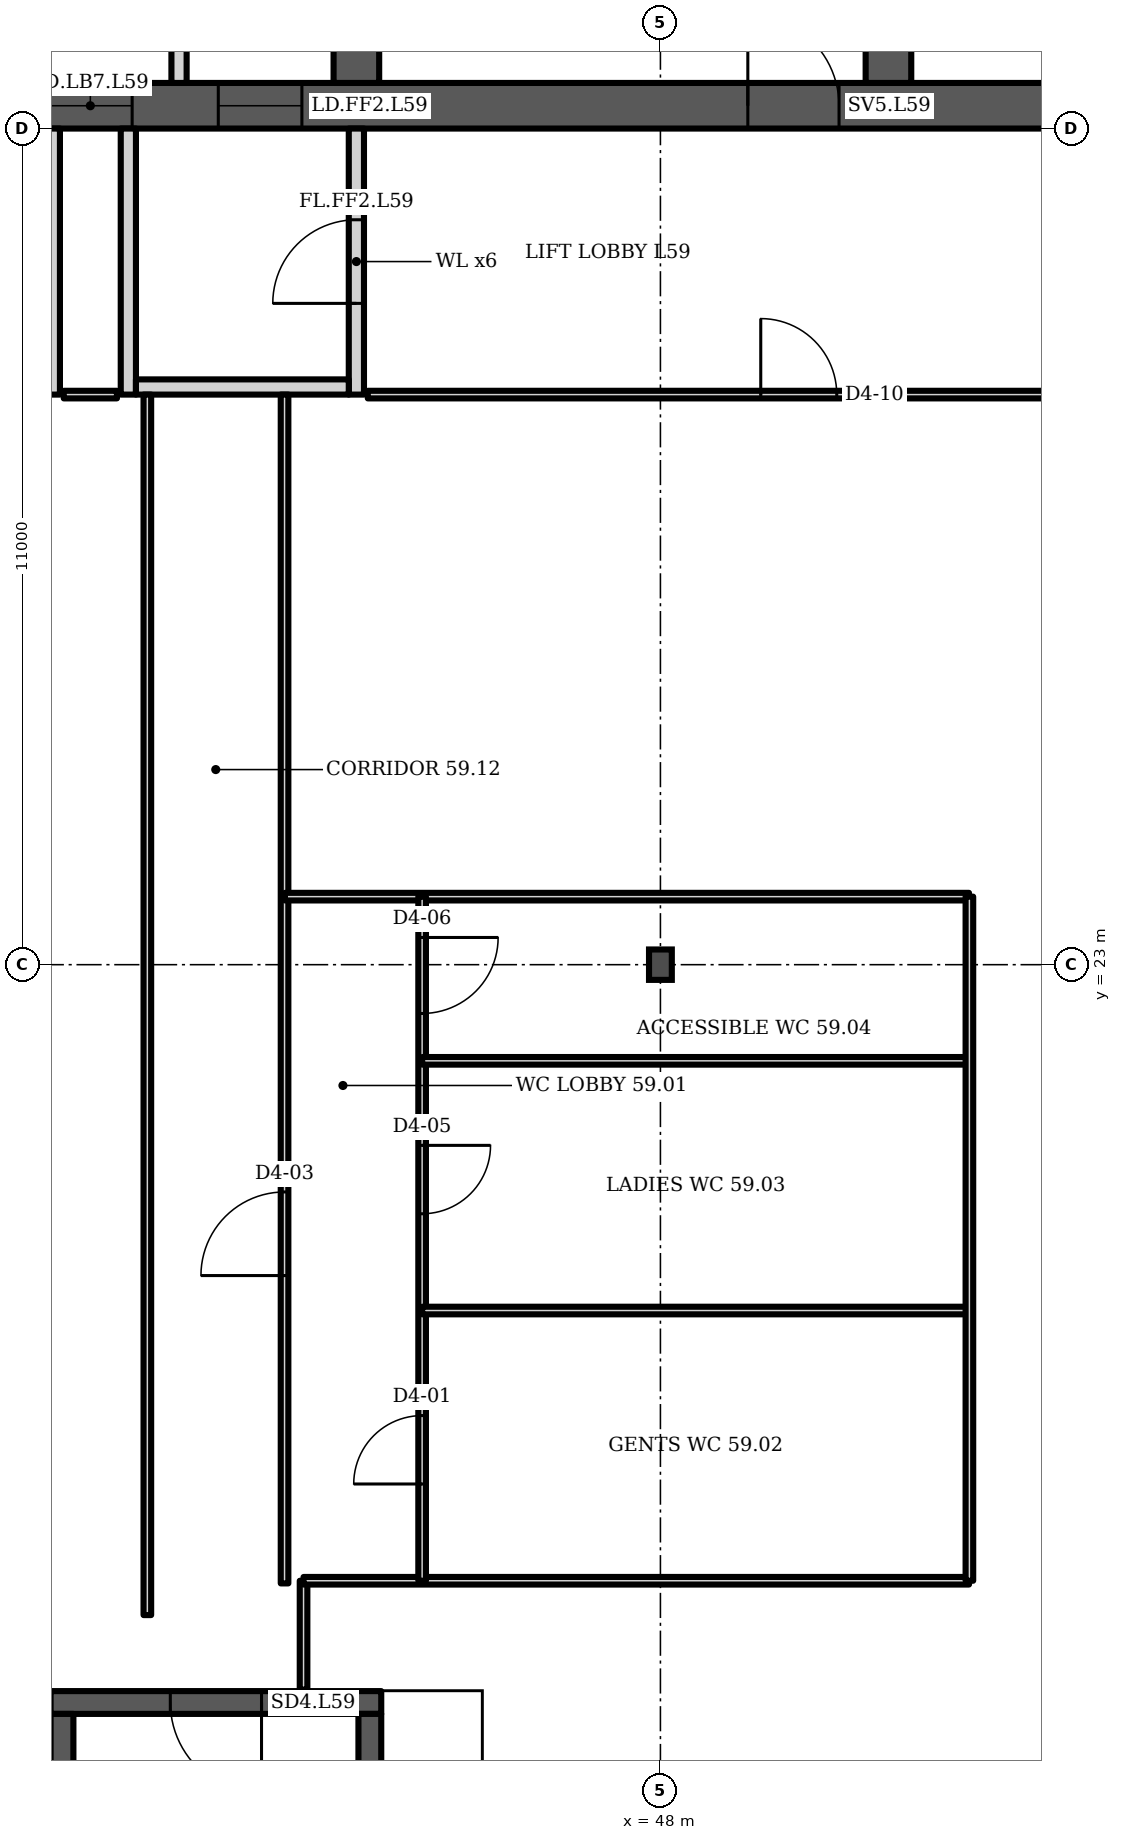
"""IFC4 building model, lengths in metres.
Left out: names, types, materials, properties, quantities, classifications, styles, units other than length and angle.
Written with IfcOpenShell. Run it as: python <this file> out.ifc"""

import sys

from ifc_helpers import new_model, si_unit, direction, frame, frame_2d, origin, origin_2d, place, context, subcontext, project, spatial, polyline, rectangle, i_section, outline, extrude, element, fill, save


model = new_model("IFC4")
c1 = context("Model", 3, precision=1e-05, world=origin(), true_north=direction((0.0, 1.0)))
c2 = subcontext(c1, "Body", "Model", "MODEL_VIEW")
j1 = project(units=[si_unit("LENGTHUNIT", "METRE"), si_unit("PLANEANGLEUNIT", "RADIAN")], contexts=[c1])
p1 = place(None, origin())
s1 = spatial("IfcSite", under=j1, at=p1, CompositionType="ELEMENT")
p2 = place(p1, origin())
s2 = spatial("IfcBuilding", under=s1, at=p2, CompositionType="ELEMENT")
p3 = place(p2, frame((0.0, 0.0, 235.9)))
s3 = spatial("IfcBuildingStorey", under=s2, at=p3, CompositionType="ELEMENT", Elevation=235.9)
p4 = place(p3, frame((23.0, 34.3, 0.0), z_axis=(0.0, 0.0, 1.0), x_axis=(1.0, 0.0, 0.0)))
e1 = element("IfcWall", 1, at=p4, inside=s3, PredefinedType="SHEAR", context=c2, shape_type="SweptSolid", body=[
    extrude(rectangle(XDim=35.0, YDim=0.6, at=frame_2d((17.5, 0.0))), origin(), (0.0, 0.0, 1.0), 3.6),
])
p5 = place(p4, frame((0.65, 0.0, 0.0)))
e2 = element("IfcOpeningElement", 2, at=p5, cuts=e1, PredefinedType="OPENING", context=c2, shape_type="SweptSolid", body=[
    extrude(rectangle(XDim=1.2, YDim=2.1, at=frame_2d((0.6, 1.05))), frame((0.0, 0.31, 0.0), z_axis=(0.0, -1.0, 0.0), x_axis=(1.0, 0.0, 0.0)), (0.0, 0.0, 1.0), 0.62),
])
p6 = place(p4, frame((7.717, 0.0, 0.0)))
e3 = element("IfcOpeningElement", 3, at=p6, cuts=e1, PredefinedType="OPENING", context=c2, shape_type="SweptSolid", body=[
    extrude(rectangle(XDim=1.1, YDim=2.1, at=frame_2d((0.55, 1.05))), frame((0.0, 0.31, 0.0), z_axis=(0.0, -1.0, 0.0), x_axis=(1.0, 0.0, 0.0)), (0.0, 0.0, 1.0), 0.62),
])
p7 = place(p4, frame((12.183, 0.0, 0.0)))
e4 = element("IfcOpeningElement", 4, at=p7, cuts=e1, PredefinedType="OPENING", context=c2, shape_type="SweptSolid", body=[
    extrude(rectangle(XDim=1.1, YDim=2.1, at=frame_2d((0.55, 1.05))), frame((0.0, 0.31, 0.0), z_axis=(0.0, -1.0, 0.0), x_axis=(1.0, 0.0, 0.0)), (0.0, 0.0, 1.0), 0.62),
])
p8 = place(p4, frame((9.8, 0.0, 0.0)))
e5 = element("IfcOpeningElement", 5, at=p8, cuts=e1, PredefinedType="OPENING", context=c2, shape_type="SweptSolid", body=[
    extrude(rectangle(XDim=1.4, YDim=2.1, at=frame_2d((0.7, 1.05))), frame((0.0, 0.31, 0.0), z_axis=(0.0, -1.0, 0.0), x_axis=(1.0, 0.0, 0.0)), (0.0, 0.0, 1.0), 0.62),
])
p9 = place(p4, frame((14.717, 0.0, 0.0)))
e6 = element("IfcOpeningElement", 6, at=p9, cuts=e1, PredefinedType="OPENING", context=c2, shape_type="SweptSolid", body=[
    extrude(rectangle(XDim=1.1, YDim=2.1, at=frame_2d((0.55, 1.05))), frame((0.0, 0.31, 0.0), z_axis=(0.0, -1.0, 0.0), x_axis=(1.0, 0.0, 0.0)), (0.0, 0.0, 1.0), 0.62),
])
p10 = place(p4, frame((16.95, 0.0, 0.0)))
e7 = element("IfcOpeningElement", 7, at=p10, cuts=e1, PredefinedType="OPENING", context=c2, shape_type="SweptSolid", body=[
    extrude(rectangle(XDim=1.1, YDim=2.1, at=frame_2d((0.55, 1.05))), frame((0.0, 0.31, 0.0), z_axis=(0.0, -1.0, 0.0), x_axis=(1.0, 0.0, 0.0)), (0.0, 0.0, 1.0), 0.62),
])
p11 = place(p4, frame((19.183, 0.0, 0.0)))
e8 = element("IfcOpeningElement", 8, at=p11, cuts=e1, PredefinedType="OPENING", context=c2, shape_type="SweptSolid", body=[
    extrude(rectangle(XDim=1.1, YDim=2.1, at=frame_2d((0.55, 1.05))), frame((0.0, 0.31, 0.0), z_axis=(0.0, -1.0, 0.0), x_axis=(1.0, 0.0, 0.0)), (0.0, 0.0, 1.0), 0.62),
])
p12 = place(p4, frame((26.15, 0.0, 0.0)))
e9 = element("IfcOpeningElement", 9, at=p12, cuts=e1, PredefinedType="OPENING", context=c2, shape_type="SweptSolid", body=[
    extrude(rectangle(XDim=1.2, YDim=2.1, at=frame_2d((0.6, 1.05))), frame((0.0, 0.31, 0.0), z_axis=(0.0, -1.0, 0.0), x_axis=(1.0, 0.0, 0.0)), (0.0, 0.0, 1.0), 0.62),
])
p13 = place(p4, frame((30.8, 0.0, 0.0)))
e10 = element("IfcOpeningElement", 10, at=p13, cuts=e1, PredefinedType="OPENING", context=c2, shape_type="SweptSolid", body=[
    extrude(rectangle(XDim=1.4, YDim=2.1, at=frame_2d((0.7, 1.05))), frame((0.0, 0.31, 0.0), z_axis=(0.0, -1.0, 0.0), x_axis=(1.0, 0.0, 0.0)), (0.0, 0.0, 1.0), 0.62),
])
p14 = place(p3, frame((44.0, 34.6, 0.0), z_axis=(0.0, 0.0, 1.0), x_axis=(0.0, 1.0, 0.0)))
e11 = element("IfcWall", 11, at=p14, inside=s3, PredefinedType="SHEAR", context=c2, shape_type="SweptSolid", body=[
    extrude(rectangle(XDim=14.784, YDim=0.6, at=frame_2d((7.392, 0.0))), origin(), (0.0, 0.0, 1.0), 3.6),
])
p15 = place(p14, frame((11.608, 0.0, 0.0)))
e12 = element("IfcOpeningElement", 12, at=p15, cuts=e11, PredefinedType="OPENING", context=c2, shape_type="SweptSolid", body=[
    extrude(rectangle(XDim=1.0, YDim=2.1, at=frame_2d((0.5, 1.05))), frame((0.0, 0.31, 0.0), z_axis=(0.0, -1.0, 0.0), x_axis=(1.0, 0.0, 0.0)), (0.0, 0.0, 1.0), 0.62),
])
p16 = place(p14, frame((3.8, 0.0, 0.0)))
e13 = element("IfcOpeningElement", 13, at=p16, cuts=e11, PredefinedType="OPENING", context=c2, shape_type="SweptSolid", body=[
    extrude(rectangle(XDim=1.1, YDim=2.1, at=frame_2d((0.55, 1.05))), frame((0.0, 0.31, 0.0), z_axis=(0.0, -1.0, 0.0), x_axis=(1.0, 0.0, 0.0)), (0.0, 0.0, 1.0), 0.62),
])
p17 = place(p3, frame((51.0, 34.6, 0.0), z_axis=(0.0, 0.0, 1.0), x_axis=(0.0, 1.0, 0.0)))
e14 = element("IfcWall", 14, at=p17, inside=s3, PredefinedType="SHEAR", context=c2, shape_type="SweptSolid", body=[
    extrude(rectangle(XDim=14.171, YDim=0.6, at=frame_2d((7.085, 0.0))), origin(), (0.0, 0.0, 1.0), 3.6),
])
p18 = place(p17, frame((3.8, 0.0, 0.0)))
e15 = element("IfcOpeningElement", 15, at=p18, cuts=e14, PredefinedType="OPENING", context=c2, shape_type="SweptSolid", body=[
    extrude(rectangle(XDim=1.1, YDim=2.1, at=frame_2d((0.55, 1.05))), frame((0.0, 0.31, 0.0), z_axis=(0.0, -1.0, 0.0), x_axis=(1.0, 0.0, 0.0)), (0.0, 0.0, 1.0), 0.62),
])
p19 = place(p3, frame((48.0, 23.0, 0.0), z_axis=(0.0, 0.0, 1.0), x_axis=(1.0, 0.0, 0.0)))
e16 = element("IfcColumn", 16, at=p19, inside=s3, PredefinedType="COLUMN", context=c2, shape_type="SweptSolid", body=[
    extrude(i_section(OverallWidth=0.3, OverallDepth=0.4, WebThickness=0.013, FlangeThickness=0.024, FilletRadius=0.027, at=origin_2d()), origin(), (0.0, 0.0, 1.0), 3.6),
])
p20 = place(p3, origin())
e17 = element("IfcWall", 17, at=p20, inside=s3, PredefinedType="PARTITIONING", context=c2, shape_type="SweptSolid", body=[
    extrude(outline(polyline([(41.567, 37.1), (39.433, 37.1), (39.433, 34.6), (39.233, 34.6), (39.233, 37.45), (37.3, 37.45), (37.3, 37.65), (39.233, 37.65), (39.433, 37.65), (39.433, 37.3), (41.567, 37.3), (41.567, 37.35), (41.767, 37.35), (43.7, 37.35), (43.7, 37.15), (41.767, 37.15), (41.767, 34.6), (41.567, 34.6), (41.567, 37.1)])), origin(), (0.0, 0.0, 1.0), 3.2),
])
for number, where, z_axis, x_axis in (
    (18, (40.0, 30.5, 0.0), (0.0, 0.0, 1.0), (0.0, 1.0, 0.0)),
    (19, (41.0, 30.5, 0.0), (0.0, 0.0, 1.0), (0.0, 1.0, 0.0)),
):
    element("IfcWall", number, at=place(p3, frame(where, z_axis=z_axis, x_axis=x_axis)), inside=s3, PredefinedType="PARTITIONING", context=c2, shape_type="SweptSolid", body=[
        extrude(rectangle(XDim=3.5, YDim=0.2, at=frame_2d((1.75, 0.0))), origin(), (0.0, 0.0, 1.0), 3.2),
    ])
p21 = place(p3, frame((44.0, 30.5, 0.0), z_axis=(0.0, 0.0, 1.0), x_axis=(0.0, 1.0, 0.0)))
e20 = element("IfcWall", 20, at=p21, inside=s3, PredefinedType="PARTITIONING", context=c2, shape_type="SweptSolid", body=[
    extrude(rectangle(XDim=3.5, YDim=0.2, at=frame_2d((1.75, 0.0))), origin(), (0.0, 0.0, 1.0), 3.2),
])
p22 = place(p21, frame((1.2, 0.0, 0.0)))
e21 = element("IfcOpeningElement", 21, at=p22, cuts=e20, PredefinedType="OPENING", context=c2, shape_type="SweptSolid", body=[
    extrude(rectangle(XDim=1.1, YDim=2.1, at=frame_2d((0.55, 1.05))), frame((0.0, 0.11, 0.0), z_axis=(0.0, -1.0, 0.0), x_axis=(1.0, 0.0, 0.0)), (0.0, 0.0, 1.0), 0.22),
])
p23 = place(p3, frame((41.1, 30.6, 0.0), z_axis=(0.0, 0.0, 1.0), x_axis=(1.0, 0.0, 0.0)))
e22 = element("IfcWall", 22, at=p23, inside=s3, PredefinedType="PARTITIONING", context=c2, shape_type="SweptSolid", body=[
    extrude(rectangle(XDim=2.8, YDim=0.2, at=frame_2d((1.4, 0.0))), origin(), (0.0, 0.0, 1.0), 3.2),
])
p24 = place(p3, frame((39.977, 13.293, 0.0), z_axis=(0.0, 0.0, 1.0), x_axis=(1.0, 0.0, 0.0)))
e23 = element("IfcWall", 23, at=p24, inside=s3, PredefinedType="SHEAR", context=c2, shape_type="SweptSolid", body=[
    extrude(rectangle(XDim=4.35, YDim=0.3, at=frame_2d((2.175, 0.0))), origin(), (0.0, 0.0, 1.0), 3.2),
])
p25 = place(p24, frame((1.575, 0.0, 0.0)))
e24 = element("IfcOpeningElement", 24, at=p25, cuts=e23, PredefinedType="OPENING", context=c2, shape_type="SweptSolid", body=[
    extrude(rectangle(XDim=1.2, YDim=2.1, at=frame_2d((0.6, 1.05))), frame((0.0, 0.16, 0.0), z_axis=(0.0, -1.0, 0.0), x_axis=(1.0, 0.0, 0.0)), (0.0, 0.0, 1.0), 0.32),
])
p26 = place(p3, frame((41.25, 14.443, 0.0), z_axis=(0.0, 0.0, 1.0), x_axis=(0.0, 1.0, 0.0)))
e25 = element("IfcWall", 25, at=p26, inside=s3, PredefinedType="PARTITIONING", context=c2, shape_type="SweptSolid", body=[
    extrude(rectangle(XDim=16.057, YDim=0.1, at=frame_2d((8.028, 0.0))), origin(), (0.0, 0.0, 1.0), 3.2),
])
p27 = place(p3, frame((43.055, 14.86, 0.0), z_axis=(0.0, 0.0, 1.0), x_axis=(0.0, 1.0, 0.0)))
e26 = element("IfcWall", 26, at=p27, inside=s3, PredefinedType="PARTITIONING", context=c2, shape_type="SweptSolid", body=[
    extrude(rectangle(XDim=15.64, YDim=0.1, at=frame_2d((7.82, 0.0))), origin(), (0.0, 0.0, 1.0), 3.2),
])
p28 = place(p27, frame((4.05, 0.0, 0.0)))
e27 = element("IfcOpeningElement", 27, at=p28, cuts=e26, PredefinedType="OPENING", context=c2, shape_type="SweptSolid", body=[
    extrude(rectangle(XDim=1.1, YDim=2.1, at=frame_2d((0.55, 1.05))), frame((0.0, 0.06, 0.0), z_axis=(0.0, -1.0, 0.0), x_axis=(1.0, 0.0, 0.0)), (0.0, 0.0, 1.0), 0.12),
])
p29 = place(p3, frame((44.15, 30.5, 0.0), z_axis=(0.0, 0.0, 1.0), x_axis=(1.0, 0.0, 0.0)))
e28 = element("IfcWall", 28, at=p29, inside=s3, PredefinedType="PARTITIONING", context=c2, shape_type="SweptSolid", body=[
    extrude(rectangle(XDim=12.95, YDim=0.1, at=frame_2d((6.475, 0.0))), origin(), (0.0, 0.0, 1.0), 3.2),
])
p30 = place(p29, frame((5.17, 0.0, 0.0)))
e29 = element("IfcOpeningElement", 29, at=p30, cuts=e28, PredefinedType="OPENING", context=c2, shape_type="SweptSolid", body=[
    extrude(rectangle(XDim=1.0, YDim=2.1, at=frame_2d((0.5, 1.05))), frame((0.0, 0.06, 0.0), z_axis=(0.0, -1.0, 0.0), x_axis=(1.0, 0.0, 0.0)), (0.0, 0.0, 1.0), 0.12),
])
p31 = place(p3, frame((43.06, 23.895, 0.0), z_axis=(0.0, 0.0, 1.0), x_axis=(1.0, 0.0, 0.0)))
e30 = element("IfcWall", 30, at=p31, inside=s3, PredefinedType="PARTITIONING", context=c2, shape_type="SweptSolid", body=[
    extrude(rectangle(XDim=9.0, YDim=0.1, at=frame_2d((4.5, 0.0))), origin(), (0.0, 0.0, 1.0), 3.2),
])
p32 = place(p3, frame((43.305, 13.463, 0.0), z_axis=(0.0, 0.0, 1.0), x_axis=(0.0, 1.0, 0.0)))
e31 = element("IfcWall", 31, at=p32, inside=s3, PredefinedType="PARTITIONING", context=c2, shape_type="SweptSolid", body=[
    extrude(rectangle(XDim=1.432, YDim=0.1, at=frame_2d((0.716, 0.0))), origin(), (0.0, 0.0, 1.0), 3.2),
])
p33 = place(p3, frame((43.305, 14.895, 0.0), z_axis=(0.0, 0.0, 1.0), x_axis=(1.0, 0.0, 0.0)))
e32 = element("IfcWall", 32, at=p33, inside=s3, PredefinedType="PARTITIONING", context=c2, shape_type="SweptSolid", body=[
    extrude(rectangle(XDim=8.755, YDim=0.1, at=frame_2d((4.377, 0.0))), origin(), (0.0, 0.0, 1.0), 3.2),
])
p34 = place(p3, frame((44.865, 14.895, 0.0), z_axis=(0.0, 0.0, 1.0), x_axis=(0.0, 1.0, 0.0)))
e33 = element("IfcWall", 33, at=p34, inside=s3, PredefinedType="PARTITIONING", context=c2, shape_type="SweptSolid", body=[
    extrude(rectangle(XDim=9.0, YDim=0.1, at=frame_2d((4.5, 0.0))), origin(), (0.0, 0.0, 1.0), 3.2),
])
p35 = place(p34, frame((1.273, 0.0, 0.0)))
e34 = element("IfcOpeningElement", 34, at=p35, cuts=e33, PredefinedType="OPENING", context=c2, shape_type="SweptSolid", body=[
    extrude(rectangle(XDim=0.9, YDim=2.1, at=frame_2d((0.45, 1.05))), frame((0.0, 0.06, 0.0), z_axis=(0.0, -1.0, 0.0), x_axis=(1.0, 0.0, 0.0)), (0.0, 0.0, 1.0), 0.12),
])
p36 = place(p34, frame((4.828, 0.0, 0.0)))
e35 = element("IfcOpeningElement", 35, at=p36, cuts=e33, PredefinedType="OPENING", context=c2, shape_type="SweptSolid", body=[
    extrude(rectangle(XDim=0.9, YDim=2.1, at=frame_2d((0.45, 1.05))), frame((0.0, 0.06, 0.0), z_axis=(0.0, -1.0, 0.0), x_axis=(1.0, 0.0, 0.0)), (0.0, 0.0, 1.0), 0.12),
])
p37 = place(p34, frame((7.463, 0.0, 0.0)))
e36 = element("IfcOpeningElement", 36, at=p37, cuts=e33, PredefinedType="OPENING", context=c2, shape_type="SweptSolid", body=[
    extrude(rectangle(XDim=1.0, YDim=2.1, at=frame_2d((0.5, 1.05))), frame((0.0, 0.06, 0.0), z_axis=(0.0, -1.0, 0.0), x_axis=(1.0, 0.0, 0.0)), (0.0, 0.0, 1.0), 0.12),
])
for number, where, z_axis, x_axis in (
    (37, (44.865, 18.45, 0.0), (0.0, 0.0, 1.0), (1.0, 0.0, 0.0)),
    (38, (44.865, 21.735, 0.0), (0.0, 0.0, 1.0), (1.0, 0.0, 0.0)),
):
    element("IfcWall", number, at=place(p3, frame(where, z_axis=z_axis, x_axis=x_axis)), inside=s3, PredefinedType="PARTITIONING", context=c2, shape_type="SweptSolid", body=[
        extrude(rectangle(XDim=7.195, YDim=0.1, at=frame_2d((3.598, 0.0))), origin(), (0.0, 0.0, 1.0), 3.2),
    ])
p38 = place(p3, frame((52.065, 14.895, 0.0), z_axis=(0.0, 0.0, 1.0), x_axis=(0.0, 1.0, 0.0)))
e39 = element("IfcWall", 39, at=p38, inside=s3, PredefinedType="PARTITIONING", context=c2, shape_type="SweptSolid", body=[
    extrude(rectangle(XDim=9.0, YDim=0.1, at=frame_2d((4.5, 0.0))), origin(), (0.0, 0.0, 1.0), 3.2),
])
p39 = place(p3, frame((40.15, 30.5, 0.0), z_axis=(0.0, 0.0, 1.0), x_axis=(1.0, 0.0, 0.0)))
e40 = element("IfcWall", 40, at=p39, inside=s3, PredefinedType="PARTITIONING", context=c2, shape_type="SweptSolid", body=[
    extrude(rectangle(XDim=0.7, YDim=0.1, at=frame_2d((0.35, 0.0))), origin(), (0.0, 0.0, 1.0), 3.2),
])
for number, where, z_axis, x_axis in (
    (41, (40.127, 5.643, 0.0), (0.0, 0.0, 1.0), (0.0, 1.0, 0.0)),
    (42, (44.177, 5.643, 0.0), (0.0, 0.0, 1.0), (0.0, 1.0, 0.0)),
):
    element("IfcWall", number, at=place(p3, frame(where, z_axis=z_axis, x_axis=x_axis)), inside=s3, PredefinedType="SHEAR", context=c2, shape_type="SweptSolid", body=[
        extrude(rectangle(XDim=7.5, YDim=0.3, at=frame_2d((3.75, 0.0))), origin(), (0.0, 0.0, 1.0), 3.2),
    ])
p40 = place(p10, origin())
e43 = element("IfcDoor", 43, at=p40, inside=s3, OperationType="DOUBLE_DOOR_SLIDING", PredefinedType="DOOR", context=c2, shape_type="SweptSolid", body=[
    extrude(rectangle(XDim=1.1, YDim=2.1, at=frame_2d((0.55, 1.05))), frame((0.0, 0.025, 0.0), z_axis=(0.0, -1.0, 0.0), x_axis=(1.0, 0.0, 0.0)), (0.0, 0.0, 1.0), 0.05),
])
fill(e7, e43)
p41 = place(p11, origin())
e44 = element("IfcDoor", 44, at=p41, inside=s3, OperationType="DOUBLE_DOOR_SLIDING", PredefinedType="DOOR", context=c2, shape_type="SweptSolid", body=[
    extrude(rectangle(XDim=1.1, YDim=2.1, at=frame_2d((0.55, 1.05))), frame((0.0, 0.025, 0.0), z_axis=(0.0, -1.0, 0.0), x_axis=(1.0, 0.0, 0.0)), (0.0, 0.0, 1.0), 0.05),
])
fill(e8, e44)
p42 = place(p12, origin())
e45 = element("IfcDoor", 45, at=p42, inside=s3, OperationType="SINGLE_SWING_LEFT", PredefinedType="DOOR", context=c2, shape_type="SweptSolid", body=[
    extrude(rectangle(XDim=1.2, YDim=2.1, at=frame_2d((0.6, 1.05))), frame((0.0, 0.025, 0.0), z_axis=(0.0, -1.0, 0.0), x_axis=(1.0, 0.0, 0.0)), (0.0, 0.0, 1.0), 0.05),
])
fill(e9, e45)
p43 = place(p22, origin())
e46 = element("IfcDoor", 46, at=p43, inside=s3, OperationType="SINGLE_SWING_LEFT", PredefinedType="DOOR", context=c2, shape_type="SweptSolid", body=[
    extrude(rectangle(XDim=1.1, YDim=2.1, at=frame_2d((0.55, 1.05))), frame((0.0, 0.025, 0.0), z_axis=(0.0, -1.0, 0.0), x_axis=(1.0, 0.0, 0.0)), (0.0, 0.0, 1.0), 0.05),
])
fill(e21, e46)
p44 = place(p25, origin())
e47 = element("IfcDoor", 47, at=p44, inside=s3, OperationType="SINGLE_SWING_RIGHT", PredefinedType="DOOR", context=c2, shape_type="SweptSolid", body=[
    extrude(rectangle(XDim=1.2, YDim=2.1, at=frame_2d((0.6, 1.05))), frame((0.0, 0.025, 0.0), z_axis=(0.0, -1.0, 0.0), x_axis=(1.0, 0.0, 0.0)), (0.0, 0.0, 1.0), 0.05),
])
fill(e24, e47)
p45 = place(p35, origin())
e48 = element("IfcDoor", 48, at=p45, inside=s3, OperationType="SINGLE_SWING_LEFT", PredefinedType="DOOR", context=c2, shape_type="SweptSolid", body=[
    extrude(rectangle(XDim=0.9, YDim=2.1, at=frame_2d((0.45, 1.05))), frame((0.0, 0.025, 0.0), z_axis=(0.0, -1.0, 0.0), x_axis=(1.0, 0.0, 0.0)), (0.0, 0.0, 1.0), 0.05),
])
fill(e34, e48)
p46 = place(p28, origin())
e49 = element("IfcDoor", 49, at=p46, inside=s3, OperationType="SINGLE_SWING_LEFT", PredefinedType="DOOR", context=c2, shape_type="SweptSolid", body=[
    extrude(rectangle(XDim=1.1, YDim=2.1, at=frame_2d((0.55, 1.05))), frame((0.0, 0.025, 0.0), z_axis=(0.0, -1.0, 0.0), x_axis=(1.0, 0.0, 0.0)), (0.0, 0.0, 1.0), 0.05),
])
fill(e27, e49)
p47 = place(p36, origin())
e50 = element("IfcDoor", 50, at=p47, inside=s3, OperationType="SINGLE_SWING_RIGHT", PredefinedType="DOOR", context=c2, shape_type="SweptSolid", body=[
    extrude(rectangle(XDim=0.9, YDim=2.1, at=frame_2d((0.45, 1.05))), frame((0.0, 0.025, 0.0), z_axis=(0.0, -1.0, 0.0), x_axis=(1.0, 0.0, 0.0)), (0.0, 0.0, 1.0), 0.05),
])
fill(e35, e50)
p48 = place(p37, origin())
e51 = element("IfcDoor", 51, at=p48, inside=s3, OperationType="SINGLE_SWING_RIGHT", PredefinedType="DOOR", context=c2, shape_type="SweptSolid", body=[
    extrude(rectangle(XDim=1.0, YDim=2.1, at=frame_2d((0.5, 1.05))), frame((0.0, 0.025, 0.0), z_axis=(0.0, -1.0, 0.0), x_axis=(1.0, 0.0, 0.0)), (0.0, 0.0, 1.0), 0.05),
])
fill(e36, e51)
p49 = place(p30, origin())
e52 = element("IfcDoor", 52, at=p49, inside=s3, OperationType="SINGLE_SWING_LEFT", PredefinedType="DOOR", context=c2, shape_type="SweptSolid", body=[
    extrude(rectangle(XDim=1.0, YDim=2.1, at=frame_2d((0.5, 1.05))), frame((0.0, 0.025, 0.0), z_axis=(0.0, -1.0, 0.0), x_axis=(1.0, 0.0, 0.0)), (0.0, 0.0, 1.0), 0.05),
])
fill(e29, e52)
save(model, sys.argv[1])
